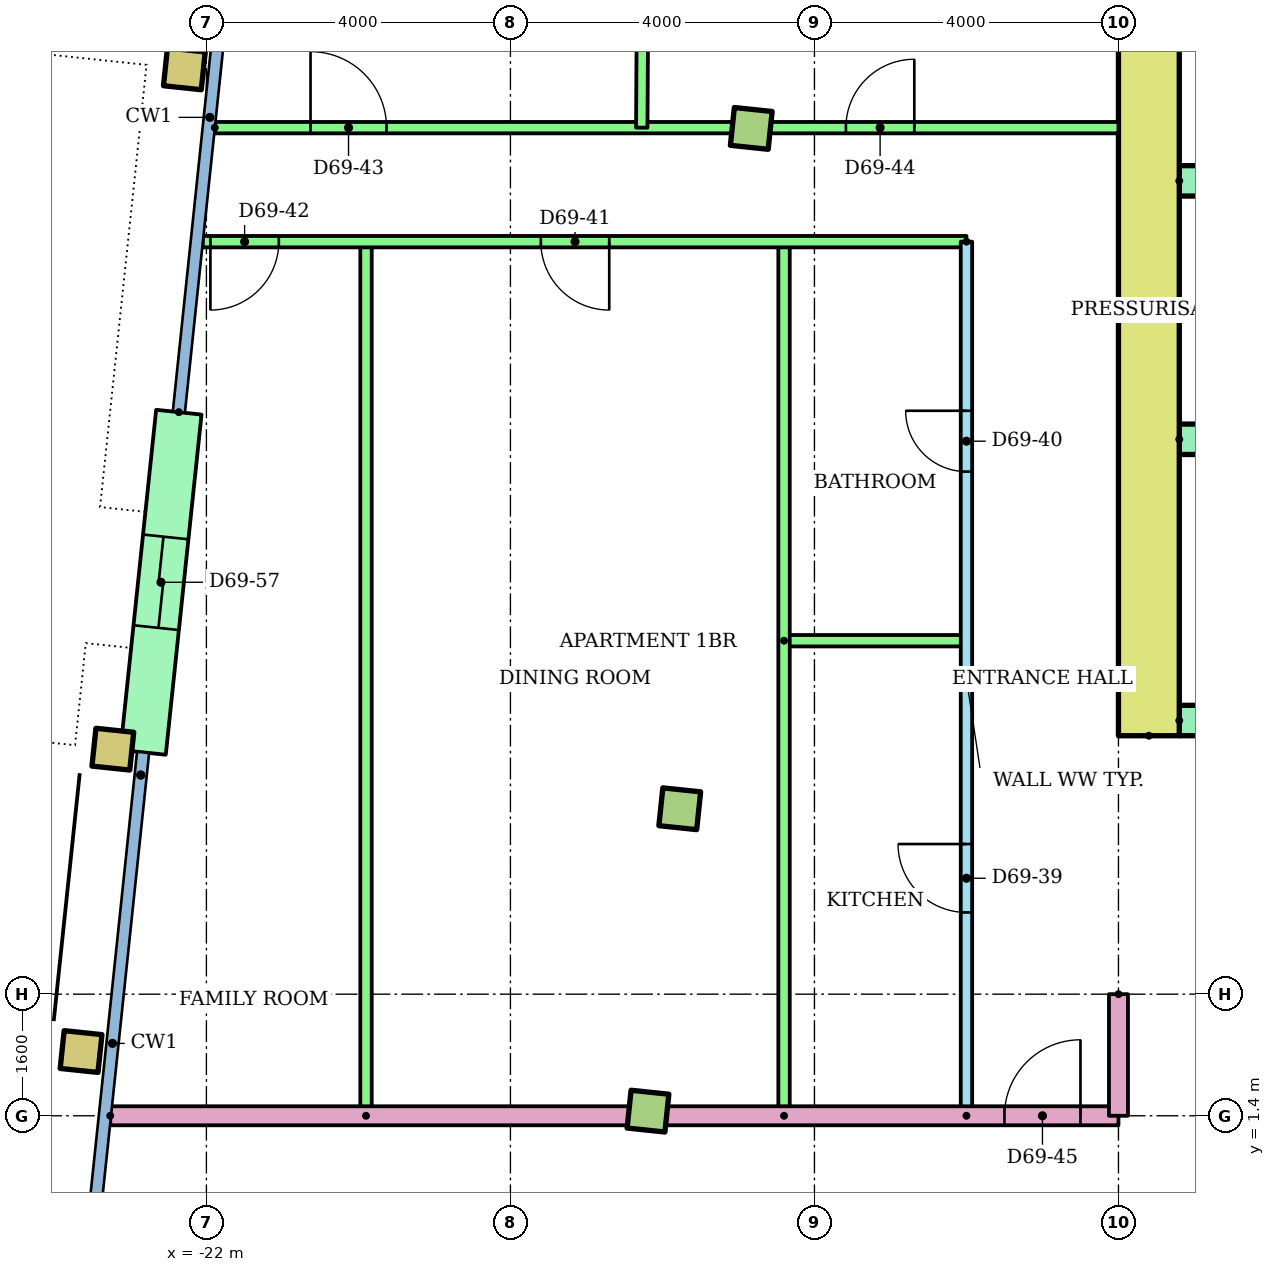
"""IFC4 building model, lengths in metres.
Left out: names, types, materials, properties, quantities, classifications, styles, units other than length and angle.
Written with IfcOpenShell. Run it as: python <this file> out.ifc"""

import sys

from ifc_helpers import new_model, si_unit, direction, frame, frame_2d, origin, origin_2d, place, context, subcontext, project, spatial, rectangle, hollow_rectangle, extrude, element, fill, save


model = new_model("IFC4")
c1 = context("Model", 3, precision=1e-05, world=origin(), true_north=direction((0.0, 1.0)))
c2 = subcontext(c1, "Body", "Model", "MODEL_VIEW")
j1 = project(units=[si_unit("LENGTHUNIT", "METRE"), si_unit("PLANEANGLEUNIT", "RADIAN")], contexts=[c1])
p1 = place(None, origin())
s1 = spatial("IfcSite", under=j1, at=p1, CompositionType="ELEMENT")
p2 = place(p1, origin())
s2 = spatial("IfcBuilding", under=s1, at=p2, CompositionType="ELEMENT")
p3 = place(p2, frame((0.0, 0.0, 265.9)))
s3 = spatial("IfcBuildingStorey", under=s2, at=p3, CompositionType="ELEMENT", Elevation=265.9)
p4 = place(p3, frame((-23.649, 2.245, 0.0), z_axis=(0.0, 0.0, 1.0), x_axis=(0.994521895368, -0.104528463268, 0.0)))
e1 = element("IfcColumn", 1, at=p4, inside=s3, PredefinedType="COLUMN", context=c2, shape_type="SweptSolid", body=[
    extrude(hollow_rectangle(XDim=0.5, YDim=0.5, WallThickness=0.025, at=origin_2d()), origin(), (0.0, 0.0, 1.0), 3.2),
])
p5 = place(p3, frame((-16.19, 1.461, 0.0), z_axis=(0.0, 0.0, 1.0), x_axis=(0.994521895368, -0.104528463268, 0.0)))
e2 = element("IfcColumn", 2, at=p5, inside=s3, PredefinedType="COLUMN", context=c2, shape_type="SweptSolid", body=[
    extrude(rectangle(XDim=0.5, YDim=0.5, at=origin_2d()), origin(), (0.0, 0.0, 1.0), 3.2),
])
p6 = place(p3, frame((-23.231, 6.223, 0.0), z_axis=(0.0, 0.0, 1.0), x_axis=(0.994521895368, -0.104528463268, 0.0)))
e3 = element("IfcColumn", 3, at=p6, inside=s3, PredefinedType="COLUMN", context=c2, shape_type="SweptSolid", body=[
    extrude(hollow_rectangle(XDim=0.5, YDim=0.5, WallThickness=0.025, at=origin_2d()), origin(), (0.0, 0.0, 1.0), 3.2),
])
p7 = place(p3, frame((-15.772, 5.439, 0.0), z_axis=(0.0, 0.0, 1.0), x_axis=(0.994521895368, -0.104528463268, 0.0)))
e4 = element("IfcColumn", 4, at=p7, inside=s3, PredefinedType="COLUMN", context=c2, shape_type="SweptSolid", body=[
    extrude(rectangle(XDim=0.5, YDim=0.5, at=origin_2d()), origin(), (0.0, 0.0, 1.0), 3.2),
])
p8 = place(p3, frame((-22.29, 15.174, 0.0), z_axis=(0.0, 0.0, 1.0), x_axis=(0.994521895368, -0.104528463268, 0.0)))
e5 = element("IfcColumn", 5, at=p8, inside=s3, PredefinedType="COLUMN", context=c2, shape_type="SweptSolid", body=[
    extrude(hollow_rectangle(XDim=0.5, YDim=0.5, WallThickness=0.025, at=origin_2d()), origin(), (0.0, 0.0, 1.0), 3.2),
])
p9 = place(p3, frame((-14.831, 14.39, 0.0), z_axis=(0.0, 0.0, 1.0), x_axis=(0.994521895368, -0.104528463268, 0.0)))
e6 = element("IfcColumn", 6, at=p9, inside=s3, PredefinedType="COLUMN", context=c2, shape_type="SweptSolid", body=[
    extrude(rectangle(XDim=0.5, YDim=0.5, at=origin_2d()), origin(), (0.0, 0.0, 1.0), 3.2),
])
p10 = place(p3, frame((-22.363, 10.657, 0.0), z_axis=(0.0, 0.0, 1.0), x_axis=(-0.104492739125, -0.994525649478, 0.0)))
e7 = element("IfcWall", 7, at=p10, inside=s3, PredefinedType="STANDARD", context=c2, shape_type="SweptSolid", body=[
    extrude(rectangle(XDim=4.5, YDim=0.6, at=frame_2d((2.25, 0.0))), origin(), (0.0, 0.0, 1.0), 2.92),
])
p11 = place(p10, frame((1.65, 0.0, 0.0)))
e8 = element("IfcOpeningElement", 8, at=p11, cuts=e7, PredefinedType="OPENING", context=c2, shape_type="SweptSolid", body=[
    extrude(rectangle(XDim=1.2, YDim=2.1, at=frame_2d((0.6, 1.05))), frame((0.0, 0.31, 0.0), z_axis=(0.0, -1.0, 0.0), x_axis=(1.0, 0.0, 0.0)), (0.0, 0.0, 1.0), 0.62),
])
p12 = place(p3, frame((-9.6, 6.4, 0.0), z_axis=(0.0, 0.0, 1.0), x_axis=(0.0, 1.0, 0.0)))
e9 = element("IfcWall", 9, at=p12, inside=s3, PredefinedType="SHEAR", context=c2, shape_type="SweptSolid", body=[
    extrude(rectangle(XDim=13.6, YDim=0.8, at=frame_2d((6.8, 0.0))), origin(), (0.0, 0.0, 1.0), 2.92),
])
p13 = place(p3, frame((-9.2, 6.6, 0.0)))
e10 = element("IfcWall", 10, at=p13, inside=s3, PredefinedType="SHEAR", context=c2, shape_type="SweptSolid", body=[
    extrude(rectangle(XDim=18.4, YDim=0.4, at=frame_2d((9.2, 0.0))), origin(), (0.0, 0.0, 1.0), 2.92),
])
p14 = place(p13, frame((8.3, 0.0, 0.0)))
e11 = element("IfcOpeningElement", 11, at=p14, cuts=e10, PredefinedType="OPENING", context=c2, shape_type="SweptSolid", body=[
    extrude(rectangle(XDim=1.8, YDim=2.1, at=frame_2d((0.9, 1.05))), frame((0.0, 0.21, 0.0), z_axis=(0.0, -1.0, 0.0), x_axis=(1.0, 0.0, 0.0)), (0.0, 0.0, 1.0), 0.42),
])
p15 = place(p13, frame((3.8, 0.0, 0.0)))
e12 = element("IfcOpeningElement", 12, at=p15, cuts=e10, PredefinedType="OPENING", context=c2, shape_type="SweptSolid", body=[
    extrude(rectangle(XDim=1.8, YDim=2.1, at=frame_2d((0.9, 1.05))), frame((0.0, 0.21, 0.0), z_axis=(0.0, -1.0, 0.0), x_axis=(1.0, 0.0, 0.0)), (0.0, 0.0, 1.0), 0.42),
])
p16 = place(p13, frame((12.8, 0.0, 0.0)))
e13 = element("IfcOpeningElement", 13, at=p16, cuts=e10, PredefinedType="OPENING", context=c2, shape_type="SweptSolid", body=[
    extrude(rectangle(XDim=1.8, YDim=2.1, at=frame_2d((0.9, 1.05))), frame((0.0, 0.21, 0.0), z_axis=(0.0, -1.0, 0.0), x_axis=(1.0, 0.0, 0.0)), (0.0, 0.0, 1.0), 0.42),
])
p17 = place(p3, frame((-9.2, 10.3, 0.0)))
e14 = element("IfcWall", 14, at=p17, inside=s3, PredefinedType="SHEAR", context=c2, shape_type="SweptSolid", body=[
    extrude(rectangle(XDim=8.0, YDim=0.4, at=frame_2d((4.0, 0.0))), origin(), (0.0, 0.0, 1.0), 2.92),
])
p18 = place(p17, frame((3.35, 0.0, 0.0)))
e15 = element("IfcOpeningElement", 15, at=p18, cuts=e14, PredefinedType="OPENING", context=c2, shape_type="SweptSolid", body=[
    extrude(rectangle(XDim=1.1, YDim=2.1, at=frame_2d((0.55, 1.05))), frame((0.0, 0.21, 0.0), z_axis=(0.0, -1.0, 0.0), x_axis=(1.0, 0.0, 0.0)), (0.0, 0.0, 1.0), 0.42),
])
p19 = place(p17, frame((6.083, 0.0, 0.0)))
e16 = element("IfcOpeningElement", 16, at=p19, cuts=e14, PredefinedType="OPENING", context=c2, shape_type="SweptSolid", body=[
    extrude(rectangle(XDim=1.1, YDim=2.1, at=frame_2d((0.55, 1.05))), frame((0.0, 0.21, 0.0), z_axis=(0.0, -1.0, 0.0), x_axis=(1.0, 0.0, 0.0)), (0.0, 0.0, 1.0), 0.42),
])
p20 = place(p17, frame((0.917, 0.0, 0.0)))
e17 = element("IfcOpeningElement", 17, at=p20, cuts=e14, PredefinedType="OPENING", context=c2, shape_type="SweptSolid", body=[
    extrude(rectangle(XDim=1.0, YDim=2.1, at=frame_2d((0.5, 1.05))), frame((0.0, 0.21, 0.0), z_axis=(0.0, -1.0, 0.0), x_axis=(1.0, 0.0, 0.0)), (0.0, 0.0, 1.0), 0.42),
])
p21 = place(p3, frame((-9.2, 13.7, 0.0)))
e18 = element("IfcWall", 18, at=p21, inside=s3, PredefinedType="SHEAR", context=c2, shape_type="SweptSolid", body=[
    extrude(rectangle(XDim=8.0, YDim=0.4, at=frame_2d((4.0, 0.0))), origin(), (0.0, 0.0, 1.0), 2.92),
])
p22 = place(p3, frame((-12.0, 1.4, 0.0), z_axis=(0.0, 0.0, 1.0), x_axis=(0.0, 1.0, 0.0)))
e19 = element("IfcWall", 19, at=p22, inside=s3, PredefinedType="PARTITIONING", context=c2, shape_type="SweptSolid", body=[
    extrude(rectangle(XDim=11.5, YDim=0.15, at=frame_2d((5.75, 0.0))), origin(), (0.0, 0.0, 1.0), 2.4),
])
p23 = place(p22, frame((2.675, 0.0, 0.0)))
e20 = element("IfcOpeningElement", 20, at=p23, cuts=e19, PredefinedType="OPENING", context=c2, shape_type="SweptSolid", body=[
    extrude(rectangle(XDim=0.9, YDim=2.1, at=frame_2d((0.45, 1.05))), frame((0.0, 0.085, 0.0), z_axis=(0.0, -1.0, 0.0), x_axis=(1.0, 0.0, 0.0)), (0.0, 0.0, 1.0), 0.17),
])
p24 = place(p22, frame((8.475, 0.0, 0.0)))
e21 = element("IfcOpeningElement", 21, at=p24, cuts=e19, PredefinedType="OPENING", context=c2, shape_type="SweptSolid", body=[
    extrude(rectangle(XDim=0.8, YDim=2.1, at=frame_2d((0.4, 1.05))), frame((0.0, 0.085, 0.0), z_axis=(0.0, -1.0, 0.0), x_axis=(1.0, 0.0, 0.0)), (0.0, 0.0, 1.0), 0.17),
])
p25 = place(p3, frame((-14.4, 7.65, 0.0)))
e22 = element("IfcWall", 22, at=p25, inside=s3, PredefinedType="PARTITIONING", context=c2, shape_type="SweptSolid", body=[
    extrude(rectangle(XDim=2.4, YDim=0.15, at=frame_2d((1.2, 0.0))), origin(), (0.0, 0.0, 1.0), 2.4),
])
for number, where, z_axis, x_axis in (
    (23, (-14.4, 1.4, 0.0), (0.0, 0.0, 1.0), (0.0, 1.0, 0.0)),
    (24, (-19.9, 1.4, 0.0), (0.0, 0.0, 1.0), (0.0, 1.0, 0.0)),
):
    element("IfcWall", number, at=place(p3, frame(where, z_axis=z_axis, x_axis=x_axis)), inside=s3, PredefinedType="PARTITIONING", context=c2, shape_type="SweptSolid", body=[
        extrude(rectangle(XDim=11.5, YDim=0.15, at=frame_2d((5.75, 0.0))), origin(), (0.0, 0.0, 1.0), 2.4),
    ])
p26 = place(p3, frame((-12.0, 12.9, 0.0), z_axis=(0.0, 0.0, 1.0), x_axis=(-1.0, 0.0, 0.0)))
e25 = element("IfcWall", 25, at=p26, inside=s3, PredefinedType="PARTITIONING", context=c2, shape_type="SweptSolid", body=[
    extrude(rectangle(XDim=10.047, YDim=0.15, at=frame_2d((5.024, 0.0))), origin(), (0.0, 0.0, 1.0), 2.4),
])
p27 = place(p26, frame((4.7, 0.0, 0.0)))
e26 = element("IfcOpeningElement", 26, at=p27, cuts=e25, PredefinedType="OPENING", context=c2, shape_type="SweptSolid", body=[
    extrude(rectangle(XDim=0.9, YDim=2.1, at=frame_2d((0.45, 1.05))), frame((0.0, 0.085, 0.0), z_axis=(0.0, -1.0, 0.0), x_axis=(1.0, 0.0, 0.0)), (0.0, 0.0, 1.0), 0.17),
])
p28 = place(p26, frame((9.047, 0.0, 0.0)))
e27 = element("IfcOpeningElement", 27, at=p28, cuts=e25, PredefinedType="OPENING", context=c2, shape_type="SweptSolid", body=[
    extrude(rectangle(XDim=0.9, YDim=2.1, at=frame_2d((0.45, 1.05))), frame((0.0, 0.085, 0.0), z_axis=(0.0, -1.0, 0.0), x_axis=(1.0, 0.0, 0.0)), (0.0, 0.0, 1.0), 0.17),
])
p29 = place(p3, frame((-21.89, 14.4, 0.0)))
e28 = element("IfcWall", 28, at=p29, inside=s3, PredefinedType="PARTITIONING", context=c2, shape_type="SweptSolid", body=[
    extrude(rectangle(XDim=11.89, YDim=0.15, at=frame_2d((5.945, 0.0))), origin(), (0.0, 0.0, 1.0), 2.4),
])
p30 = place(p29, frame((1.26, 0.0, 0.0)))
e29 = element("IfcOpeningElement", 29, at=p30, cuts=e28, PredefinedType="OPENING", context=c2, shape_type="SweptSolid", body=[
    extrude(rectangle(XDim=1.0, YDim=2.1, at=frame_2d((0.5, 1.05))), frame((0.0, 0.085, 0.0), z_axis=(0.0, -1.0, 0.0), x_axis=(1.0, 0.0, 0.0)), (0.0, 0.0, 1.0), 0.17),
])
p31 = place(p29, frame((8.304, 0.0, 0.0)))
e30 = element("IfcOpeningElement", 30, at=p31, cuts=e28, PredefinedType="OPENING", context=c2, shape_type="SweptSolid", body=[
    extrude(rectangle(XDim=0.9, YDim=2.1, at=frame_2d((0.45, 1.05))), frame((0.0, 0.085, 0.0), z_axis=(0.0, -1.0, 0.0), x_axis=(1.0, 0.0, 0.0)), (0.0, 0.0, 1.0), 0.17),
])
p32 = place(p3, frame((-16.222, 22.61, 0.0), z_axis=(0.0, 0.0, 1.0), x_axis=(-0.006095634594, -0.999981421447, 0.0)))
e31 = element("IfcWall", 31, at=p32, inside=s3, PredefinedType="PARTITIONING", context=c2, shape_type="SweptSolid", body=[
    extrude(rectangle(XDim=8.211, YDim=0.15, at=frame_2d((4.105, 0.0))), origin(), (0.0, 0.0, 1.0), 2.4),
])
p33 = place(p3, frame((-23.265, 1.4, 0.0)))
e32 = element("IfcWall", 32, at=p33, inside=s3, PredefinedType="PARTITIONING", context=c2, shape_type="SweptSolid", body=[
    extrude(rectangle(XDim=13.265, YDim=0.25, at=frame_2d((6.633, 0.0))), origin(), (0.0, 0.0, 1.0), 2.4),
])
p34 = place(p33, frame((11.765, 0.0, 0.0)))
e33 = element("IfcOpeningElement", 33, at=p34, cuts=e32, PredefinedType="OPENING", context=c2, shape_type="SweptSolid", body=[
    extrude(rectangle(XDim=1.0, YDim=2.1, at=frame_2d((0.5, 1.05))), frame((0.0, 0.135, 0.0), z_axis=(0.0, -1.0, 0.0), x_axis=(1.0, 0.0, 0.0)), (0.0, 0.0, 1.0), 0.27),
])
p35 = place(p3, frame((-10.0, 3.0, 0.0), z_axis=(0.0, 0.0, 1.0), x_axis=(0.0, -1.0, 0.0)))
e34 = element("IfcWall", 34, at=p35, inside=s3, PredefinedType="PARTITIONING", context=c2, shape_type="SweptSolid", body=[
    extrude(rectangle(XDim=1.6, YDim=0.25, at=frame_2d((0.8, 0.0))), origin(), (0.0, 0.0, 1.0), 2.4),
])
p36 = place(p23, origin())
e35 = element("IfcDoor", 35, at=p36, inside=s3, OperationType="SINGLE_SWING_RIGHT", PredefinedType="DOOR", context=c2, shape_type="SweptSolid", body=[
    extrude(rectangle(XDim=0.9, YDim=2.1, at=frame_2d((0.45, 1.05))), frame((0.0, 0.025, 0.0), z_axis=(0.0, -1.0, 0.0), x_axis=(1.0, 0.0, 0.0)), (0.0, 0.0, 1.0), 0.05),
])
fill(e20, e35)
p37 = place(p24, origin())
e36 = element("IfcDoor", 36, at=p37, inside=s3, OperationType="SINGLE_SWING_RIGHT", PredefinedType="DOOR", context=c2, shape_type="SweptSolid", body=[
    extrude(rectangle(XDim=0.8, YDim=2.1, at=frame_2d((0.4, 1.05))), frame((0.0, 0.025, 0.0), z_axis=(0.0, -1.0, 0.0), x_axis=(1.0, 0.0, 0.0)), (0.0, 0.0, 1.0), 0.05),
])
fill(e21, e36)
p38 = place(p27, origin())
e37 = element("IfcDoor", 37, at=p38, inside=s3, OperationType="SINGLE_SWING_LEFT", PredefinedType="DOOR", context=c2, shape_type="SweptSolid", body=[
    extrude(rectangle(XDim=0.9, YDim=2.1, at=frame_2d((0.45, 1.05))), frame((0.0, 0.025, 0.0), z_axis=(0.0, -1.0, 0.0), x_axis=(1.0, 0.0, 0.0)), (0.0, 0.0, 1.0), 0.05),
])
fill(e26, e37)
p39 = place(p28, origin())
e38 = element("IfcDoor", 38, at=p39, inside=s3, OperationType="SINGLE_SWING_RIGHT", PredefinedType="DOOR", context=c2, shape_type="SweptSolid", body=[
    extrude(rectangle(XDim=0.9, YDim=2.1, at=frame_2d((0.45, 1.05))), frame((0.0, 0.025, 0.0), z_axis=(0.0, -1.0, 0.0), x_axis=(1.0, 0.0, 0.0)), (0.0, 0.0, 1.0), 0.05),
])
fill(e27, e38)
p40 = place(p30, origin())
e39 = element("IfcDoor", 39, at=p40, inside=s3, OperationType="SINGLE_SWING_LEFT", PredefinedType="DOOR", context=c2, shape_type="SweptSolid", body=[
    extrude(rectangle(XDim=1.0, YDim=2.1, at=frame_2d((0.5, 1.05))), frame((0.0, 0.025, 0.0), z_axis=(0.0, -1.0, 0.0), x_axis=(1.0, 0.0, 0.0)), (0.0, 0.0, 1.0), 0.05),
])
fill(e29, e39)
p41 = place(p31, origin())
e40 = element("IfcDoor", 40, at=p41, inside=s3, OperationType="SINGLE_SWING_RIGHT", PredefinedType="DOOR", context=c2, shape_type="SweptSolid", body=[
    extrude(rectangle(XDim=0.9, YDim=2.1, at=frame_2d((0.45, 1.05))), frame((0.0, 0.025, 0.0), z_axis=(0.0, -1.0, 0.0), x_axis=(1.0, 0.0, 0.0)), (0.0, 0.0, 1.0), 0.05),
])
fill(e30, e40)
p42 = place(p34, origin())
e41 = element("IfcDoor", 41, at=p42, inside=s3, OperationType="SINGLE_SWING_RIGHT", PredefinedType="DOOR", context=c2, shape_type="SweptSolid", body=[
    extrude(rectangle(XDim=1.0, YDim=2.1, at=frame_2d((0.5, 1.05))), frame((0.0, 0.025, 0.0), z_axis=(0.0, -1.0, 0.0), x_axis=(1.0, 0.0, 0.0)), (0.0, 0.0, 1.0), 0.05),
])
fill(e33, e41)
p43 = place(p11, origin())
e42 = element("IfcDoor", 42, at=p43, inside=s3, OperationType="SLIDING_TO_LEFT", PredefinedType="DOOR", context=c2, shape_type="SweptSolid", body=[
    extrude(rectangle(XDim=1.2, YDim=2.1, at=frame_2d((0.6, 1.05))), frame((0.0, 0.025, 0.0), z_axis=(0.0, -1.0, 0.0), x_axis=(1.0, 0.0, 0.0)), (0.0, 0.0, 1.0), 0.05),
])
fill(e8, e42)
save(model, sys.argv[1])
